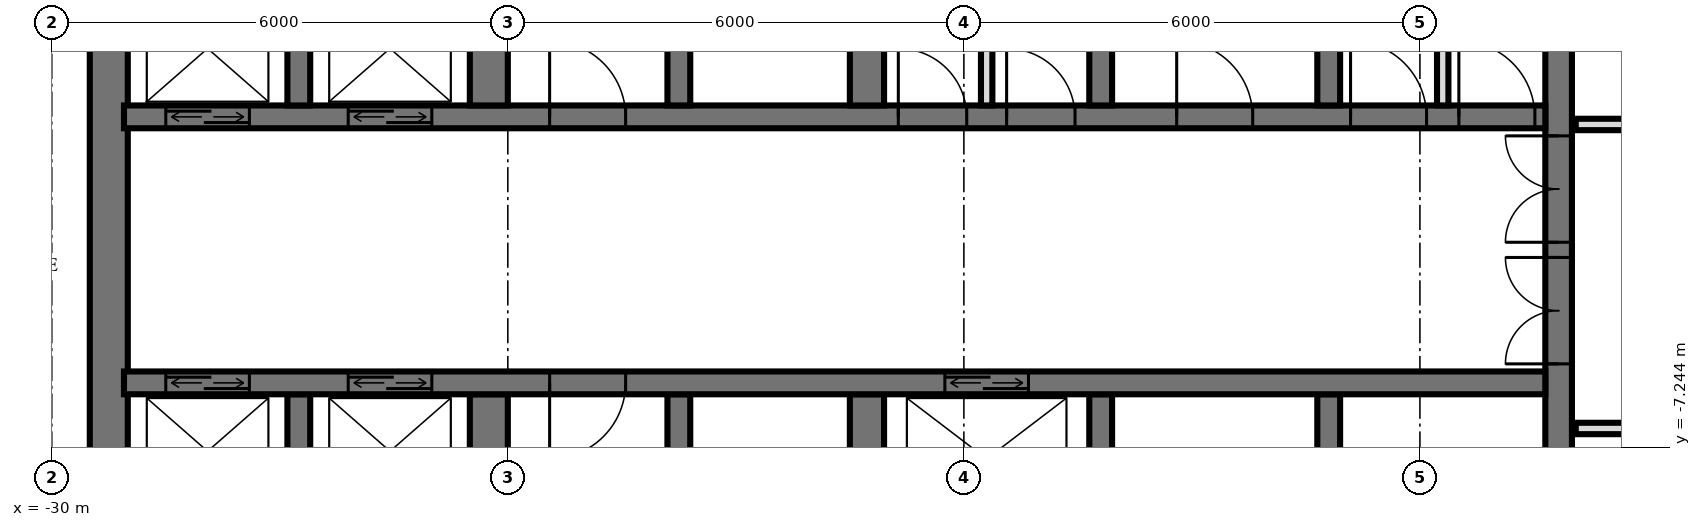
"""IFC4 building model, lengths in metres.
Left out: names, types, materials, properties, quantities, classifications, styles, units other than length and angle.
Written with IfcOpenShell. Run it as: python <this file> out.ifc"""

import sys

from ifc_helpers import new_model, si_unit, direction, frame, frame_2d, origin, place, context, subcontext, project, spatial, rectangle, extrude, element, fill, save


model = new_model("IFC4")
c1 = context("Model", 3, precision=1e-05, world=origin(), true_north=direction((0.0, 1.0)))
c2 = subcontext(c1, "Body", "Model", "MODEL_VIEW")
j1 = project(units=[si_unit("LENGTHUNIT", "METRE"), si_unit("PLANEANGLEUNIT", "RADIAN")], contexts=[c1])
p1 = place(None, origin())
s1 = spatial("IfcSite", under=j1, at=p1, CompositionType="ELEMENT")
p2 = place(p1, origin())
s2 = spatial("IfcBuilding", under=s1, at=p2, CompositionType="ELEMENT")
p3 = place(p2, frame((0.0, 0.0, 63.6)))
s3 = spatial("IfcBuildingStorey", under=s2, at=p3, CompositionType="ELEMENT", Elevation=63.6)
p4 = place(p3, frame((-10.175, -14.55, 0.0), z_axis=(0.0, 0.0, 1.0), x_axis=(0.0, 1.0, 0.0)))
e1 = element("IfcWall", 1, at=p4, inside=s3, PredefinedType="SHEAR", context=c2, shape_type="SweptSolid", body=[
    extrude(rectangle(XDim=14.1, YDim=0.35, at=frame_2d((7.05, 0.0))), origin(), (0.0, 0.0, 1.0), 3.6),
])
p5 = place(p4, frame((8.4, 0.0, 0.0)))
e2 = element("IfcOpeningElement", 2, at=p5, cuts=e1, PredefinedType="OPENING", context=c2, shape_type="SweptSolid", body=[
    extrude(rectangle(XDim=1.4, YDim=2.4, at=frame_2d((0.7, 1.2))), frame((0.0, 0.185, 0.0), z_axis=(0.0, -1.0, 0.0), x_axis=(1.0, 0.0, 0.0)), (0.0, 0.0, 1.0), 0.37),
])
p6 = place(p4, frame((10.0, 0.0, 0.0)))
e3 = element("IfcOpeningElement", 3, at=p6, cuts=e1, PredefinedType="OPENING", context=c2, shape_type="SweptSolid", body=[
    extrude(rectangle(XDim=1.4, YDim=2.4, at=frame_2d((0.7, 1.2))), frame((0.0, 0.185, 0.0), z_axis=(0.0, -1.0, 0.0), x_axis=(1.0, 0.0, 0.0)), (0.0, 0.0, 1.0), 0.37),
])
p7 = place(p4, frame((4.0, 0.0, 0.0)))
e4 = element("IfcOpeningElement", 4, at=p7, cuts=e1, PredefinedType="OPENING", context=c2, shape_type="SweptSolid", body=[
    extrude(rectangle(XDim=1.2, YDim=2.1, at=frame_2d((0.6, 1.05))), frame((0.0, 0.185, 0.0), z_axis=(0.0, -1.0, 0.0), x_axis=(1.0, 0.0, 0.0)), (0.0, 0.0, 1.0), 0.37),
])
p8 = place(p3, frame((-29.25, -14.55, 0.0), z_axis=(0.0, 0.0, 1.0), x_axis=(0.0, 1.0, 0.0)))
e5 = element("IfcWall", 5, at=p8, inside=s3, PredefinedType="SHEAR", context=c2, shape_type="SweptSolid", body=[
    extrude(rectangle(XDim=14.1, YDim=0.5, at=frame_2d((7.05, 0.0))), origin(), (0.0, 0.0, 1.0), 3.6),
])
p9 = place(p3, frame((-29.05, -2.9, 0.0), z_axis=(0.0, 0.0, 1.0), x_axis=(1.0, 0.0, 0.0)))
e6 = element("IfcWall", 6, at=p9, inside=s3, PredefinedType="SHEAR", context=c2, shape_type="SweptSolid", body=[
    extrude(rectangle(XDim=18.7, YDim=0.3, at=frame_2d((9.35, 0.0))), origin(), (0.0, 0.0, 1.0), 3.6),
])
p10 = place(p9, frame((2.95, 0.0, 0.0)))
e7 = element("IfcOpeningElement", 7, at=p10, cuts=e6, PredefinedType="OPENING", context=c2, shape_type="SweptSolid", body=[
    extrude(rectangle(XDim=1.1, YDim=2.1, at=frame_2d((0.55, 1.05))), frame((0.0, 0.16, 0.0), z_axis=(0.0, -1.0, 0.0), x_axis=(1.0, 0.0, 0.0)), (0.0, 0.0, 1.0), 0.32),
])
p11 = place(p9, frame((0.55, 0.0, 0.0)))
e8 = element("IfcOpeningElement", 8, at=p11, cuts=e6, PredefinedType="OPENING", context=c2, shape_type="SweptSolid", body=[
    extrude(rectangle(XDim=1.1, YDim=2.1, at=frame_2d((0.55, 1.05))), frame((0.0, 0.16, 0.0), z_axis=(0.0, -1.0, 0.0), x_axis=(1.0, 0.0, 0.0)), (0.0, 0.0, 1.0), 0.32),
])
p12 = place(p9, frame((11.613, 0.0, 0.0)))
e9 = element("IfcOpeningElement", 9, at=p12, cuts=e6, PredefinedType="OPENING", context=c2, shape_type="SweptSolid", body=[
    extrude(rectangle(XDim=0.9, YDim=2.1, at=frame_2d((0.45, 1.05))), frame((0.0, 0.16, 0.0), z_axis=(0.0, -1.0, 0.0), x_axis=(1.0, 0.0, 0.0)), (0.0, 0.0, 1.0), 0.32),
])
p13 = place(p9, frame((10.188, 0.0, 0.0)))
e10 = element("IfcOpeningElement", 10, at=p13, cuts=e6, PredefinedType="OPENING", context=c2, shape_type="SweptSolid", body=[
    extrude(rectangle(XDim=0.9, YDim=2.1, at=frame_2d((0.45, 1.05))), frame((0.0, 0.16, 0.0), z_axis=(0.0, -1.0, 0.0), x_axis=(1.0, 0.0, 0.0)), (0.0, 0.0, 1.0), 0.32),
])
p14 = place(p9, frame((17.562, 0.0, 0.0)))
e11 = element("IfcOpeningElement", 11, at=p14, cuts=e6, PredefinedType="OPENING", context=c2, shape_type="SweptSolid", body=[
    extrude(rectangle(XDim=1.0, YDim=2.1, at=frame_2d((0.5, 1.05))), frame((0.0, 0.16, 0.0), z_axis=(0.0, -1.0, 0.0), x_axis=(1.0, 0.0, 0.0)), (0.0, 0.0, 1.0), 0.32),
])
p15 = place(p9, frame((16.137, 0.0, 0.0)))
e12 = element("IfcOpeningElement", 12, at=p15, cuts=e6, PredefinedType="OPENING", context=c2, shape_type="SweptSolid", body=[
    extrude(rectangle(XDim=1.0, YDim=2.1, at=frame_2d((0.5, 1.05))), frame((0.0, 0.16, 0.0), z_axis=(0.0, -1.0, 0.0), x_axis=(1.0, 0.0, 0.0)), (0.0, 0.0, 1.0), 0.32),
])
p16 = place(p9, frame((13.85, 0.0, 0.0)))
e13 = element("IfcOpeningElement", 13, at=p16, cuts=e6, PredefinedType="OPENING", context=c2, shape_type="SweptSolid", body=[
    extrude(rectangle(XDim=1.0, YDim=2.1, at=frame_2d((0.5, 1.05))), frame((0.0, 0.16, 0.0), z_axis=(0.0, -1.0, 0.0), x_axis=(1.0, 0.0, 0.0)), (0.0, 0.0, 1.0), 0.32),
])
p17 = place(p9, frame((5.6, 0.0, 0.0)))
e14 = element("IfcOpeningElement", 14, at=p17, cuts=e6, PredefinedType="OPENING", context=c2, shape_type="SweptSolid", body=[
    extrude(rectangle(XDim=1.0, YDim=2.1, at=frame_2d((0.5, 1.05))), frame((0.0, 0.16, 0.0), z_axis=(0.0, -1.0, 0.0), x_axis=(1.0, 0.0, 0.0)), (0.0, 0.0, 1.0), 0.32),
])
p18 = place(p3, frame((-29.05, -6.4, 0.0), z_axis=(0.0, 0.0, 1.0), x_axis=(1.0, 0.0, 0.0)))
e15 = element("IfcWall", 15, at=p18, inside=s3, PredefinedType="SHEAR", context=c2, shape_type="SweptSolid", body=[
    extrude(rectangle(XDim=18.7, YDim=0.3, at=frame_2d((9.35, 0.0))), origin(), (0.0, 0.0, 1.0), 3.6),
])
p19 = place(p18, frame((2.95, 0.0, 0.0)))
e16 = element("IfcOpeningElement", 16, at=p19, cuts=e15, PredefinedType="OPENING", context=c2, shape_type="SweptSolid", body=[
    extrude(rectangle(XDim=1.1, YDim=2.1, at=frame_2d((0.55, 1.05))), frame((0.0, 0.16, 0.0), z_axis=(0.0, -1.0, 0.0), x_axis=(1.0, 0.0, 0.0)), (0.0, 0.0, 1.0), 0.32),
])
p20 = place(p18, frame((0.55, 0.0, 0.0)))
e17 = element("IfcOpeningElement", 17, at=p20, cuts=e15, PredefinedType="OPENING", context=c2, shape_type="SweptSolid", body=[
    extrude(rectangle(XDim=1.1, YDim=2.1, at=frame_2d((0.55, 1.05))), frame((0.0, 0.16, 0.0), z_axis=(0.0, -1.0, 0.0), x_axis=(1.0, 0.0, 0.0)), (0.0, 0.0, 1.0), 0.32),
])
p21 = place(p18, frame((10.8, 0.0, 0.0)))
e18 = element("IfcOpeningElement", 18, at=p21, cuts=e15, PredefinedType="OPENING", context=c2, shape_type="SweptSolid", body=[
    extrude(rectangle(XDim=1.1, YDim=2.1, at=frame_2d((0.55, 1.05))), frame((0.0, 0.16, 0.0), z_axis=(0.0, -1.0, 0.0), x_axis=(1.0, 0.0, 0.0)), (0.0, 0.0, 1.0), 0.32),
])
p22 = place(p18, frame((5.6, 0.0, 0.0)))
e19 = element("IfcOpeningElement", 19, at=p22, cuts=e15, PredefinedType="OPENING", context=c2, shape_type="SweptSolid", body=[
    extrude(rectangle(XDim=1.0, YDim=2.1, at=frame_2d((0.5, 1.05))), frame((0.0, 0.16, 0.0), z_axis=(0.0, -1.0, 0.0), x_axis=(1.0, 0.0, 0.0)), (0.0, 0.0, 1.0), 0.32),
])
for number, where, z_axis, x_axis in (
    (20, (-13.2, -2.75, 0.0), (0.0, 0.0, 1.0), (0.0, 1.0, 0.0)),
    (21, (-13.2, -8.85, 0.0), (0.0, 0.0, 1.0), (0.0, 1.0, 0.0)),
    (22, (-16.2, -2.75, 0.0), (0.0, 0.0, 1.0), (0.0, 1.0, 0.0)),
    (23, (-16.2, -8.85, 0.0), (0.0, 0.0, 1.0), (0.0, 1.0, 0.0)),
):
    element("IfcWall", number, at=place(p3, frame(where, z_axis=z_axis, x_axis=x_axis)), inside=s3, PredefinedType="SHEAR", context=c2, shape_type="SweptSolid", body=[
        extrude(rectangle(XDim=2.3, YDim=0.3, at=frame_2d((1.15, 0.0))), origin(), (0.0, 0.0, 1.0), 3.6),
    ])
for number, where, z_axis, x_axis in (
    (24, (-19.275, -2.75, 0.0), (0.0, 0.0, 1.0), (0.0, 1.0, 0.0)),
    (25, (-19.275, -8.85, 0.0), (0.0, 0.0, 1.0), (0.0, 1.0, 0.0)),
):
    element("IfcWall", number, at=place(p3, frame(where, z_axis=z_axis, x_axis=x_axis)), inside=s3, PredefinedType="SHEAR", context=c2, shape_type="SweptSolid", body=[
        extrude(rectangle(XDim=2.3, YDim=0.45, at=frame_2d((1.15, 0.0))), origin(), (0.0, 0.0, 1.0), 3.6),
    ])
for number, where, z_axis, x_axis in (
    (26, (-21.75, -2.75, 0.0), (0.0, 0.0, 1.0), (0.0, 1.0, 0.0)),
    (27, (-21.75, -8.85, 0.0), (0.0, 0.0, 1.0), (0.0, 1.0, 0.0)),
):
    element("IfcWall", number, at=place(p3, frame(where, z_axis=z_axis, x_axis=x_axis)), inside=s3, PredefinedType="SHEAR", context=c2, shape_type="SweptSolid", body=[
        extrude(rectangle(XDim=2.3, YDim=0.3, at=frame_2d((1.15, 0.0))), origin(), (0.0, 0.0, 1.0), 3.6),
    ])
for number, where, z_axis, x_axis in (
    (28, (-24.25, -2.75, 0.0), (0.0, 0.0, 1.0), (0.0, 1.0, 0.0)),
    (29, (-24.25, -8.85, 0.0), (0.0, 0.0, 1.0), (0.0, 1.0, 0.0)),
):
    element("IfcWall", number, at=place(p3, frame(where, z_axis=z_axis, x_axis=x_axis)), inside=s3, PredefinedType="SHEAR", context=c2, shape_type="SweptSolid", body=[
        extrude(rectangle(XDim=2.3, YDim=0.5, at=frame_2d((1.15, 0.0))), origin(), (0.0, 0.0, 1.0), 3.6),
    ])
for number, where, z_axis, x_axis in (
    (30, (-26.75, -2.75, 0.0), (0.0, 0.0, 1.0), (0.0, 1.0, 0.0)),
    (31, (-26.75, -8.85, 0.0), (0.0, 0.0, 1.0), (0.0, 1.0, 0.0)),
):
    element("IfcWall", number, at=place(p3, frame(where, z_axis=z_axis, x_axis=x_axis)), inside=s3, PredefinedType="SHEAR", context=c2, shape_type="SweptSolid", body=[
        extrude(rectangle(XDim=2.3, YDim=0.3, at=frame_2d((1.15, 0.0))), origin(), (0.0, 0.0, 1.0), 3.6),
    ])
for number, where, z_axis, x_axis in (
    (32, (-17.7, -2.75, 0.0), (0.0, 0.0, 1.0), (0.0, 1.0, 0.0)),
    (33, (-11.7, -2.75, 0.0), (0.0, 0.0, 1.0), (0.0, 1.0, 0.0)),
):
    element("IfcWall", number, at=place(p3, frame(where, z_axis=z_axis, x_axis=x_axis)), inside=s3, PredefinedType="PARTITIONING", context=c2, shape_type="SweptSolid", body=[
        extrude(rectangle(XDim=2.3, YDim=0.15, at=frame_2d((1.15, 0.0))), origin(), (0.0, 0.0, 1.0), 3.3),
    ])
p23 = place(p3, frame((-9.95, -7.0, 0.0), z_axis=(0.0, 0.0, 1.0), x_axis=(1.0, 0.0, 0.0)))
e34 = element("IfcWall", 34, at=p23, inside=s3, PredefinedType="PARTITIONING", context=c2, shape_type="SweptSolid", body=[
    extrude(rectangle(XDim=19.9, YDim=0.15, at=frame_2d((9.95, 0.0))), origin(), (0.0, 0.0, 1.0), 3.32),
])
p24 = place(p23, frame((9.45, 0.0, 0.0)))
e35 = element("IfcOpeningElement", 35, at=p24, cuts=e34, PredefinedType="OPENING", context=c2, shape_type="SweptSolid", body=[
    extrude(rectangle(XDim=1.0, YDim=2.1, at=frame_2d((0.5, 1.05))), frame((0.0, 0.085, 0.0), z_axis=(0.0, -1.0, 0.0), x_axis=(1.0, 0.0, 0.0)), (0.0, 0.0, 1.0), 0.17),
])
p25 = place(p23, frame((15.45, 0.0, 0.0)))
e36 = element("IfcOpeningElement", 36, at=p25, cuts=e34, PredefinedType="OPENING", context=c2, shape_type="SweptSolid", body=[
    extrude(rectangle(XDim=1.0, YDim=2.1, at=frame_2d((0.5, 1.05))), frame((0.0, 0.085, 0.0), z_axis=(0.0, -1.0, 0.0), x_axis=(1.0, 0.0, 0.0)), (0.0, 0.0, 1.0), 0.17),
])
p26 = place(p3, frame((-9.95, -3.0, 0.0), z_axis=(0.0, 0.0, 1.0), x_axis=(1.0, 0.0, 0.0)))
e37 = element("IfcWall", 37, at=p26, inside=s3, PredefinedType="PARTITIONING", context=c2, shape_type="SweptSolid", body=[
    extrude(rectangle(XDim=19.9, YDim=0.15, at=frame_2d((9.95, 0.0))), origin(), (0.0, 0.0, 1.0), 3.32),
])
p27 = place(p26, frame((0.95, 0.0, 0.0)))
e38 = element("IfcOpeningElement", 38, at=p27, cuts=e37, PredefinedType="OPENING", context=c2, shape_type="SweptSolid", body=[
    extrude(rectangle(XDim=1.0, YDim=2.1, at=frame_2d((0.5, 1.05))), frame((0.0, 0.085, 0.0), z_axis=(0.0, -1.0, 0.0), x_axis=(1.0, 0.0, 0.0)), (0.0, 0.0, 1.0), 0.17),
])
p28 = place(p26, frame((3.7, 0.0, 0.0)))
e39 = element("IfcOpeningElement", 39, at=p28, cuts=e37, PredefinedType="OPENING", context=c2, shape_type="SweptSolid", body=[
    extrude(rectangle(XDim=1.0, YDim=2.1, at=frame_2d((0.5, 1.05))), frame((0.0, 0.085, 0.0), z_axis=(0.0, -1.0, 0.0), x_axis=(1.0, 0.0, 0.0)), (0.0, 0.0, 1.0), 0.17),
])
p29 = place(p26, frame((7.95, 0.0, 0.0)))
e40 = element("IfcOpeningElement", 40, at=p29, cuts=e37, PredefinedType="OPENING", context=c2, shape_type="SweptSolid", body=[
    extrude(rectangle(XDim=1.0, YDim=2.1, at=frame_2d((0.5, 1.05))), frame((0.0, 0.085, 0.0), z_axis=(0.0, -1.0, 0.0), x_axis=(1.0, 0.0, 0.0)), (0.0, 0.0, 1.0), 0.17),
])
p30 = place(p26, frame((15.2, 0.0, 0.0)))
e41 = element("IfcOpeningElement", 41, at=p30, cuts=e37, PredefinedType="OPENING", context=c2, shape_type="SweptSolid", body=[
    extrude(rectangle(XDim=1.0, YDim=2.1, at=frame_2d((0.5, 1.05))), frame((0.0, 0.085, 0.0), z_axis=(0.0, -1.0, 0.0), x_axis=(1.0, 0.0, 0.0)), (0.0, 0.0, 1.0), 0.17),
])
p31 = place(p10, origin())
e42 = element("IfcDoor", 42, at=p31, inside=s3, OperationType="DOUBLE_DOOR_SLIDING", PredefinedType="USERDEFINED", context=c2, shape_type="SweptSolid", body=[
    extrude(rectangle(XDim=1.1, YDim=2.1, at=frame_2d((0.55, 1.05))), frame((0.0, 0.025, 0.0), z_axis=(0.0, -1.0, 0.0), x_axis=(1.0, 0.0, 0.0)), (0.0, 0.0, 1.0), 0.05),
])
fill(e7, e42)
p32 = place(p11, origin())
e43 = element("IfcDoor", 43, at=p32, inside=s3, OperationType="DOUBLE_DOOR_SLIDING", PredefinedType="USERDEFINED", context=c2, shape_type="SweptSolid", body=[
    extrude(rectangle(XDim=1.1, YDim=2.1, at=frame_2d((0.55, 1.05))), frame((0.0, 0.025, 0.0), z_axis=(0.0, -1.0, 0.0), x_axis=(1.0, 0.0, 0.0)), (0.0, 0.0, 1.0), 0.05),
])
fill(e8, e43)
p33 = place(p19, origin())
e44 = element("IfcDoor", 44, at=p33, inside=s3, OperationType="DOUBLE_DOOR_SLIDING", PredefinedType="USERDEFINED", context=c2, shape_type="SweptSolid", body=[
    extrude(rectangle(XDim=1.1, YDim=2.1, at=frame_2d((0.55, 1.05))), frame((0.0, 0.025, 0.0), z_axis=(0.0, -1.0, 0.0), x_axis=(1.0, 0.0, 0.0)), (0.0, 0.0, 1.0), 0.05),
])
fill(e16, e44)
p34 = place(p20, origin())
e45 = element("IfcDoor", 45, at=p34, inside=s3, OperationType="DOUBLE_DOOR_SLIDING", PredefinedType="USERDEFINED", context=c2, shape_type="SweptSolid", body=[
    extrude(rectangle(XDim=1.1, YDim=2.1, at=frame_2d((0.55, 1.05))), frame((0.0, 0.025, 0.0), z_axis=(0.0, -1.0, 0.0), x_axis=(1.0, 0.0, 0.0)), (0.0, 0.0, 1.0), 0.05),
])
fill(e17, e45)
p35 = place(p21, origin())
e46 = element("IfcDoor", 46, at=p35, inside=s3, OperationType="DOUBLE_DOOR_SLIDING", PredefinedType="USERDEFINED", context=c2, shape_type="SweptSolid", body=[
    extrude(rectangle(XDim=1.1, YDim=2.1, at=frame_2d((0.55, 1.05))), frame((0.0, 0.025, 0.0), z_axis=(0.0, -1.0, 0.0), x_axis=(1.0, 0.0, 0.0)), (0.0, 0.0, 1.0), 0.05),
])
fill(e18, e46)
p36 = place(p5, origin())
e47 = element("IfcDoor", 47, at=p36, inside=s3, OperationType="DOUBLE_DOOR_SINGLE_SWING", PredefinedType="DOOR", context=c2, shape_type="SweptSolid", body=[
    extrude(rectangle(XDim=1.4, YDim=2.4, at=frame_2d((0.7, 1.2))), frame((0.0, 0.025, 0.0), z_axis=(0.0, -1.0, 0.0), x_axis=(1.0, 0.0, 0.0)), (0.0, 0.0, 1.0), 0.05),
])
fill(e2, e47)
p37 = place(p6, origin())
e48 = element("IfcDoor", 48, at=p37, inside=s3, OperationType="DOUBLE_DOOR_SINGLE_SWING", PredefinedType="DOOR", context=c2, shape_type="SweptSolid", body=[
    extrude(rectangle(XDim=1.4, YDim=2.4, at=frame_2d((0.7, 1.2))), frame((0.0, 0.025, 0.0), z_axis=(0.0, -1.0, 0.0), x_axis=(1.0, 0.0, 0.0)), (0.0, 0.0, 1.0), 0.05),
])
fill(e3, e48)
p38 = place(p12, origin())
e49 = element("IfcDoor", 49, at=p38, inside=s3, OperationType="SINGLE_SWING_RIGHT", PredefinedType="DOOR", context=c2, shape_type="SweptSolid", body=[
    extrude(rectangle(XDim=0.9, YDim=2.1, at=frame_2d((0.45, 1.05))), frame((0.0, 0.025, 0.0), z_axis=(0.0, -1.0, 0.0), x_axis=(1.0, 0.0, 0.0)), (0.0, 0.0, 1.0), 0.05),
])
fill(e9, e49)
p39 = place(p13, origin())
e50 = element("IfcDoor", 50, at=p39, inside=s3, OperationType="SINGLE_SWING_RIGHT", PredefinedType="DOOR", context=c2, shape_type="SweptSolid", body=[
    extrude(rectangle(XDim=0.9, YDim=2.1, at=frame_2d((0.45, 1.05))), frame((0.0, 0.025, 0.0), z_axis=(0.0, -1.0, 0.0), x_axis=(1.0, 0.0, 0.0)), (0.0, 0.0, 1.0), 0.05),
])
fill(e10, e50)
p40 = place(p14, origin())
e51 = element("IfcDoor", 51, at=p40, inside=s3, OperationType="SINGLE_SWING_RIGHT", PredefinedType="DOOR", context=c2, shape_type="SweptSolid", body=[
    extrude(rectangle(XDim=1.0, YDim=2.1, at=frame_2d((0.5, 1.05))), frame((0.0, 0.025, 0.0), z_axis=(0.0, -1.0, 0.0), x_axis=(1.0, 0.0, 0.0)), (0.0, 0.0, 1.0), 0.05),
])
fill(e11, e51)
p41 = place(p15, origin())
e52 = element("IfcDoor", 52, at=p41, inside=s3, OperationType="SINGLE_SWING_RIGHT", PredefinedType="DOOR", context=c2, shape_type="SweptSolid", body=[
    extrude(rectangle(XDim=1.0, YDim=2.1, at=frame_2d((0.5, 1.05))), frame((0.0, 0.025, 0.0), z_axis=(0.0, -1.0, 0.0), x_axis=(1.0, 0.0, 0.0)), (0.0, 0.0, 1.0), 0.05),
])
fill(e12, e52)
p42 = place(p16, origin())
e53 = element("IfcDoor", 53, at=p42, inside=s3, OperationType="SINGLE_SWING_RIGHT", PredefinedType="DOOR", context=c2, shape_type="SweptSolid", body=[
    extrude(rectangle(XDim=1.0, YDim=2.1, at=frame_2d((0.5, 1.05))), frame((0.0, 0.025, 0.0), z_axis=(0.0, -1.0, 0.0), x_axis=(1.0, 0.0, 0.0)), (0.0, 0.0, 1.0), 0.05),
])
fill(e13, e53)
p43 = place(p17, origin())
e54 = element("IfcDoor", 54, at=p43, inside=s3, OperationType="SINGLE_SWING_RIGHT", PredefinedType="DOOR", context=c2, shape_type="SweptSolid", body=[
    extrude(rectangle(XDim=1.0, YDim=2.1, at=frame_2d((0.5, 1.05))), frame((0.0, 0.025, 0.0), z_axis=(0.0, -1.0, 0.0), x_axis=(1.0, 0.0, 0.0)), (0.0, 0.0, 1.0), 0.05),
])
fill(e14, e54)
p44 = place(p22, frame((0.5, 0.0, 0.0), z_axis=(0.0, 0.0, 1.0), x_axis=(-1.0, 0.0, 0.0)))
e55 = element("IfcDoor", 55, at=p44, inside=s3, OperationType="SINGLE_SWING_LEFT", PredefinedType="DOOR", context=c2, shape_type="SweptSolid", body=[
    extrude(rectangle(XDim=1.0, YDim=2.1, at=frame_2d((0.0, 1.05))), frame((0.0, -0.025, 0.0), z_axis=(0.0, 1.0, 0.0), x_axis=(-1.0, 0.0, 0.0)), (0.0, 0.0, 1.0), 0.05),
])
fill(e19, e55)
save(model, sys.argv[1])
